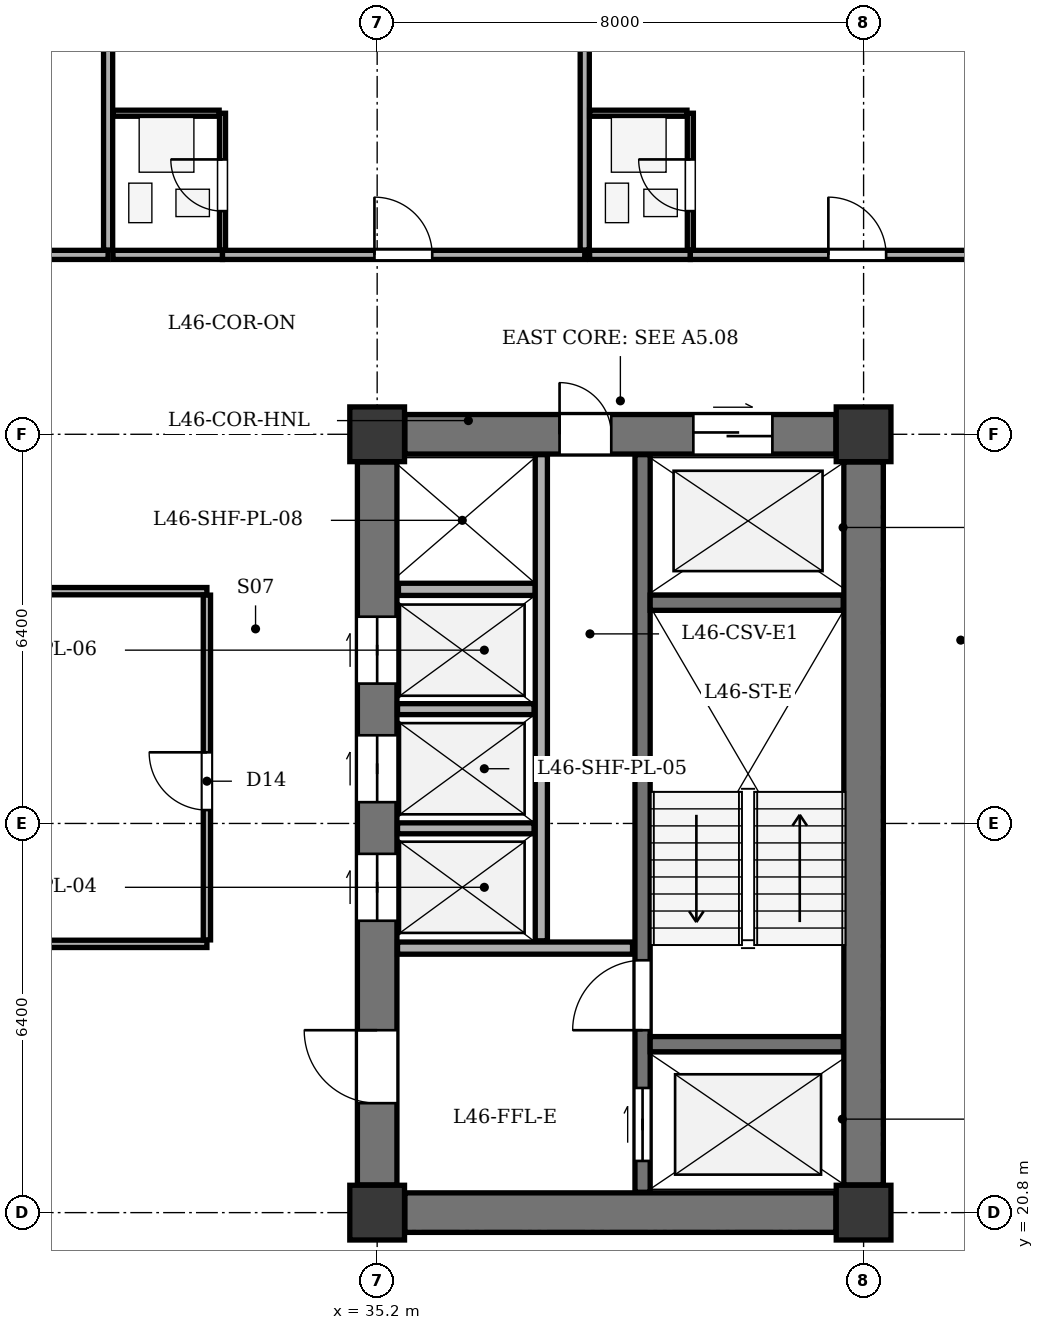
"""IFC4 building model, lengths in metres.
Left out: names, types, materials, properties, quantities, classifications, styles, units other than length and angle.
Written with IfcOpenShell. Run it as: python <this file> out.ifc"""

import sys

from ifc_helpers import new_model, si_unit, direction, frame, frame_2d, origin, origin_2d, place, context, subcontext, project, spatial, rectangle, extrude, element, fill, save


model = new_model("IFC4")
c1 = context("Model", 3, precision=1e-05, world=origin(), true_north=direction((0.0, 1.0)))
c2 = subcontext(c1, "Body", "Model", "MODEL_VIEW")
j1 = project(units=[si_unit("LENGTHUNIT", "METRE"), si_unit("PLANEANGLEUNIT", "RADIAN")], contexts=[c1])
p1 = place(None, origin())
s1 = spatial("IfcSite", under=j1, at=p1, CompositionType="ELEMENT")
p2 = place(p1, origin())
s2 = spatial("IfcBuilding", under=s1, at=p2, CompositionType="ELEMENT")
p3 = place(p2, frame((0.0, 0.0, 179.8)))
s3 = spatial("IfcBuildingStorey", under=s2, at=p3, CompositionType="ELEMENT", Elevation=179.8)
for number, where, z_axis, x_axis in (
    (1, (35.2, 20.8, 0.0), (0.0, 0.0, 1.0), (1.0, 0.0, 0.0)),
    (2, (43.2, 20.8, 0.0), (0.0, 0.0, 1.0), (1.0, 0.0, 0.0)),
    (3, (35.2, 33.6, 0.0), (0.0, 0.0, 1.0), (1.0, 0.0, 0.0)),
    (4, (43.2, 33.6, 0.0), (0.0, 0.0, 1.0), (1.0, 0.0, 0.0)),
):
    element("IfcColumn", number, at=place(p3, frame(where, z_axis=z_axis, x_axis=x_axis)), inside=s3, PredefinedType="COLUMN", context=c2, shape_type="SweptSolid", body=[
        extrude(rectangle(XDim=0.9, YDim=0.9, at=origin_2d()), origin(), (0.0, 0.0, 1.0), 3.5),
    ])
p4 = place(p3, frame((43.2, 21.255, 0.0), z_axis=(0.0, 0.0, 1.0), x_axis=(0.0, 1.0, 0.0)))
e5 = element("IfcWall", 5, at=p4, inside=s3, PredefinedType="SHEAR", context=c2, shape_type="SweptSolid", body=[
    extrude(rectangle(XDim=11.89, YDim=0.65, at=frame_2d((5.945, 0.0))), origin(), (0.0, 0.0, 1.0), 3.05),
])
p5 = place(p3, frame((35.655, 20.8, 0.0), z_axis=(0.0, 0.0, 1.0), x_axis=(1.0, 0.0, 0.0)))
e6 = element("IfcWall", 6, at=p5, inside=s3, PredefinedType="SHEAR", context=c2, shape_type="SweptSolid", body=[
    extrude(rectangle(XDim=7.09, YDim=0.65, at=frame_2d((3.545, 0.0))), origin(), (0.0, 0.0, 1.0), 3.05),
])
p6 = place(p3, frame((35.655, 33.6, 0.0), z_axis=(0.0, 0.0, 1.0), x_axis=(1.0, 0.0, 0.0)))
e7 = element("IfcWall", 7, at=p6, inside=s3, PredefinedType="SHEAR", context=c2, shape_type="SweptSolid", body=[
    extrude(rectangle(XDim=7.09, YDim=0.65, at=frame_2d((3.545, 0.0))), origin(), (0.0, 0.0, 1.0), 3.05),
])
p7 = place(p6, frame((4.745, 0.0, 0.0)))
e8 = element("IfcOpeningElement", 8, at=p7, cuts=e7, PredefinedType="OPENING", context=c2, shape_type="SweptSolid", body=[
    extrude(rectangle(XDim=1.3, YDim=2.15, at=frame_2d((0.65, 1.075))), frame((0.0, 0.335, 0.0), z_axis=(0.0, -1.0, 0.0), x_axis=(1.0, 0.0, 0.0)), (0.0, 0.0, 1.0), 0.67),
])
p8 = place(p6, frame((2.545, 0.0, 0.0)))
e9 = element("IfcOpeningElement", 9, at=p8, cuts=e7, PredefinedType="OPENING", context=c2, shape_type="SweptSolid", body=[
    extrude(rectangle(XDim=0.85, YDim=2.02, at=frame_2d((0.425, 1.01))), frame((0.0, 0.335, 0.0), z_axis=(0.0, -1.0, 0.0), x_axis=(1.0, 0.0, 0.0)), (0.0, 0.0, 1.0), 0.67),
])
p9 = place(p3, frame((35.2, 21.255, 0.0), z_axis=(0.0, 0.0, 1.0), x_axis=(0.0, 1.0, 0.0)))
e10 = element("IfcWall", 10, at=p9, inside=s3, PredefinedType="SHEAR", context=c2, shape_type="SweptSolid", body=[
    extrude(rectangle(XDim=11.89, YDim=0.65, at=frame_2d((5.945, 0.0))), origin(), (0.0, 0.0, 1.0), 3.05),
])
p10 = place(p9, frame((1.345, 0.0, 0.0)))
e11 = element("IfcOpeningElement", 11, at=p10, cuts=e10, PredefinedType="OPENING", context=c2, shape_type="SweptSolid", body=[
    extrude(rectangle(XDim=1.2, YDim=2.15, at=frame_2d((0.6, 1.075))), frame((0.0, 0.335, 0.0), z_axis=(0.0, -1.0, 0.0), x_axis=(1.0, 0.0, 0.0)), (0.0, 0.0, 1.0), 0.67),
])
p11 = place(p9, frame((4.345, 0.0, 0.0)))
e12 = element("IfcOpeningElement", 12, at=p11, cuts=e10, PredefinedType="OPENING", context=c2, shape_type="SweptSolid", body=[
    extrude(rectangle(XDim=1.1, YDim=2.1, at=frame_2d((0.55, 1.05))), frame((0.0, 0.335, 0.0), z_axis=(0.0, -1.0, 0.0), x_axis=(1.0, 0.0, 0.0)), (0.0, 0.0, 1.0), 0.67),
])
p12 = place(p9, frame((6.295, 0.0, 0.0)))
e13 = element("IfcOpeningElement", 13, at=p12, cuts=e10, PredefinedType="OPENING", context=c2, shape_type="SweptSolid", body=[
    extrude(rectangle(XDim=1.1, YDim=2.1, at=frame_2d((0.55, 1.05))), frame((0.0, 0.335, 0.0), z_axis=(0.0, -1.0, 0.0), x_axis=(1.0, 0.0, 0.0)), (0.0, 0.0, 1.0), 0.67),
])
p13 = place(p9, frame((8.245, 0.0, 0.0)))
e14 = element("IfcOpeningElement", 14, at=p13, cuts=e10, PredefinedType="OPENING", context=c2, shape_type="SweptSolid", body=[
    extrude(rectangle(XDim=1.1, YDim=2.1, at=frame_2d((0.55, 1.05))), frame((0.0, 0.335, 0.0), z_axis=(0.0, -1.0, 0.0), x_axis=(1.0, 0.0, 0.0)), (0.0, 0.0, 1.0), 0.67),
])
p14 = place(p3, frame((39.565, 21.135, 0.0), z_axis=(0.0, 0.0, 1.0), x_axis=(0.0, 1.0, 0.0)))
e15 = element("IfcWall", 15, at=p14, inside=s3, PredefinedType="SHEAR", context=c2, shape_type="SweptSolid", body=[
    extrude(rectangle(XDim=12.13, YDim=0.25, at=frame_2d((6.065, 0.0))), origin(), (0.0, 0.0, 1.0), 3.05),
])
p15 = place(p14, frame((0.515, 0.0, 0.0)))
e16 = element("IfcOpeningElement", 16, at=p15, cuts=e15, PredefinedType="OPENING", context=c2, shape_type="SweptSolid", body=[
    extrude(rectangle(XDim=1.2, YDim=2.15, at=frame_2d((0.6, 1.075))), frame((0.0, 0.135, 0.0), z_axis=(0.0, -1.0, 0.0), x_axis=(1.0, 0.0, 0.0)), (0.0, 0.0, 1.0), 0.27),
])
p16 = place(p14, frame((2.665, 0.0, 0.0)))
e17 = element("IfcOpeningElement", 17, at=p16, cuts=e15, PredefinedType="OPENING", context=c2, shape_type="SweptSolid", body=[
    extrude(rectangle(XDim=1.15, YDim=2.15, at=frame_2d((0.575, 1.075))), frame((0.0, 0.135, 0.0), z_axis=(0.0, -1.0, 0.0), x_axis=(1.0, 0.0, 0.0)), (0.0, 0.0, 1.0), 0.27),
])
for number, where, z_axis, x_axis in (
    (18, (39.69, 23.57, 0.0), (0.0, 0.0, 1.0), (1.0, 0.0, 0.0)),
    (19, (39.69, 30.83, 0.0), (0.0, 0.0, 1.0), (1.0, 0.0, 0.0)),
):
    element("IfcWall", number, at=place(p3, frame(where, z_axis=z_axis, x_axis=x_axis)), inside=s3, PredefinedType="SHEAR", context=c2, shape_type="SweptSolid", body=[
        extrude(rectangle(XDim=3.175, YDim=0.25, at=frame_2d((1.587, 0.0))), origin(), (0.0, 0.0, 1.0), 3.05),
    ])
p17 = place(p3, frame((35.535, 25.15, 0.0), z_axis=(0.0, 0.0, 1.0), x_axis=(1.0, 0.0, 0.0)))
e20 = element("IfcWall", 20, at=p17, inside=s3, PredefinedType="SOLIDWALL", context=c2, shape_type="SweptSolid", body=[
    extrude(rectangle(XDim=3.865, YDim=0.2, at=frame_2d((1.933, 0.0))), origin(), (0.0, 0.0, 1.0), 3.05),
])
p18 = place(p3, frame((35.55, 31.05, 0.0), z_axis=(0.0, 0.0, 1.0), x_axis=(1.0, 0.0, 0.0)))
e21 = element("IfcWall", 21, at=p18, inside=s3, PredefinedType="SOLIDWALL", context=c2, shape_type="SweptSolid", body=[
    extrude(rectangle(XDim=2.25, YDim=0.2, at=frame_2d((1.125, 0.0))), origin(), (0.0, 0.0, 1.0), 3.05),
])
p19 = place(p3, frame((37.9, 25.27, 0.0), z_axis=(0.0, 0.0, 1.0), x_axis=(0.0, 1.0, 0.0)))
e22 = element("IfcWall", 22, at=p19, inside=s3, PredefinedType="SOLIDWALL", context=c2, shape_type="SweptSolid", body=[
    extrude(rectangle(XDim=7.995, YDim=0.2, at=frame_2d((3.998, 0.0))), origin(), (0.0, 0.0, 1.0), 3.05),
])
for number, where, z_axis, x_axis in (
    (23, (35.535, 27.12, 0.0), (0.0, 0.0, 1.0), (1.0, 0.0, 0.0)),
    (24, (35.535, 29.08, 0.0), (0.0, 0.0, 1.0), (1.0, 0.0, 0.0)),
):
    element("IfcWall", number, at=place(p3, frame(where, z_axis=z_axis, x_axis=x_axis)), inside=s3, PredefinedType="PARTITIONING", context=c2, shape_type="SweptSolid", body=[
        extrude(rectangle(XDim=2.245, YDim=0.18, at=frame_2d((1.123, 0.0))), origin(), (0.0, 0.0, 1.0), 3.05),
    ])
p20 = place(p3, frame((20.46, 25.22, 0.0), z_axis=(0.0, 0.0, 1.0), x_axis=(1.0, 0.0, 0.0)))
e25 = element("IfcWall", 25, at=p20, inside=s3, PredefinedType="PARTITIONING", context=c2, shape_type="SweptSolid", body=[
    extrude(rectangle(XDim=11.94, YDim=0.12, at=frame_2d((5.97, 0.0))), origin(), (0.0, 0.0, 1.0), 3.05),
])
p21 = place(p20, frame((0.68, 0.0, 0.0)))
e26 = element("IfcOpeningElement", 26, at=p21, cuts=e25, PredefinedType="OPENING", context=c2, shape_type="SweptSolid", body=[
    extrude(rectangle(XDim=1.0, YDim=2.1, at=frame_2d((0.5, 1.05))), frame((0.0, 0.07, 0.0), z_axis=(0.0, -1.0, 0.0), x_axis=(1.0, 0.0, 0.0)), (0.0, 0.0, 1.0), 0.14),
])
p22 = place(p3, frame((20.46, 31.02, 0.0), z_axis=(0.0, 0.0, 1.0), x_axis=(1.0, 0.0, 0.0)))
e27 = element("IfcWall", 27, at=p22, inside=s3, PredefinedType="PARTITIONING", context=c2, shape_type="SweptSolid", body=[
    extrude(rectangle(XDim=11.94, YDim=0.12, at=frame_2d((5.97, 0.0))), origin(), (0.0, 0.0, 1.0), 3.05),
])
p23 = place(p3, frame((32.4, 25.285, 0.0), z_axis=(0.0, 0.0, 1.0), x_axis=(0.0, 1.0, 0.0)))
e28 = element("IfcWall", 28, at=p23, inside=s3, PredefinedType="PARTITIONING", context=c2, shape_type="SweptSolid", body=[
    extrude(rectangle(XDim=5.67, YDim=0.12, at=frame_2d((2.835, 0.0))), origin(), (0.0, 0.0, 1.0), 3.05),
])
p24 = place(p23, frame((2.135, 0.0, 0.0)))
e29 = element("IfcOpeningElement", 29, at=p24, cuts=e28, PredefinedType="OPENING", context=c2, shape_type="SweptSolid", body=[
    extrude(rectangle(XDim=0.95, YDim=2.1, at=frame_2d((0.475, 1.05))), frame((0.0, 0.07, 0.0), z_axis=(0.0, -1.0, 0.0), x_axis=(1.0, 0.0, 0.0)), (0.0, 0.0, 1.0), 0.14),
])
p25 = place(p3, frame((24.817, 36.55, 0.0), z_axis=(0.0, 0.0, 1.0), x_axis=(1.0, 0.0, 0.0)))
e30 = element("IfcWall", 30, at=p25, inside=s3, PredefinedType="PARTITIONING", context=c2, shape_type="SweptSolid", body=[
    extrude(rectangle(XDim=5.958, YDim=0.15, at=frame_2d((2.979, 0.0))), origin(), (0.0, 0.0, 1.0), 3.05),
])
p26 = place(p25, frame((2.499, 0.0, 0.0)))
e31 = element("IfcOpeningElement", 31, at=p26, cuts=e30, PredefinedType="OPENING", context=c2, shape_type="SweptSolid", body=[
    extrude(rectangle(XDim=0.95, YDim=2.1, at=frame_2d((0.475, 1.05))), frame((0.0, 0.085, 0.0), z_axis=(0.0, -1.0, 0.0), x_axis=(1.0, 0.0, 0.0)), (0.0, 0.0, 1.0), 0.17),
])
p27 = place(p3, frame((30.775, 36.63, 0.0), z_axis=(0.0, 0.0, 1.0), x_axis=(0.0, 1.0, 0.0)))
e32 = element("IfcWall", 32, at=p27, inside=s3, PredefinedType="PARTITIONING", context=c2, shape_type="SweptSolid", body=[
    extrude(rectangle(XDim=15.895, YDim=0.15, at=frame_2d((7.948, 0.0))), origin(), (0.0, 0.0, 1.0), 3.05),
])
p28 = place(p3, frame((30.855, 36.55, 0.0), z_axis=(0.0, 0.0, 1.0), x_axis=(1.0, 0.0, 0.0)))
e33 = element("IfcWall", 33, at=p28, inside=s3, PredefinedType="PARTITIONING", context=c2, shape_type="SweptSolid", body=[
    extrude(rectangle(XDim=1.802, YDim=0.15, at=frame_2d((0.901, 0.0))), origin(), (0.0, 0.0, 1.0), 3.05),
])
p29 = place(p3, frame((32.656, 36.55, 0.0), z_axis=(0.0, 0.0, 1.0), x_axis=(1.0, 0.0, 0.0)))
e34 = element("IfcWall", 34, at=p29, inside=s3, PredefinedType="PARTITIONING", context=c2, shape_type="SweptSolid", body=[
    extrude(rectangle(XDim=5.958, YDim=0.15, at=frame_2d((2.979, 0.0))), origin(), (0.0, 0.0, 1.0), 3.05),
])
p30 = place(p29, frame((2.499, 0.0, 0.0)))
e35 = element("IfcOpeningElement", 35, at=p30, cuts=e34, PredefinedType="OPENING", context=c2, shape_type="SweptSolid", body=[
    extrude(rectangle(XDim=0.95, YDim=2.1, at=frame_2d((0.475, 1.05))), frame((0.0, 0.085, 0.0), z_axis=(0.0, -1.0, 0.0), x_axis=(1.0, 0.0, 0.0)), (0.0, 0.0, 1.0), 0.17),
])
p31 = place(p3, frame((32.656, 36.63, 0.0), z_axis=(0.0, 0.0, 1.0), x_axis=(0.0, 1.0, 0.0)))
e36 = element("IfcWall", 36, at=p31, inside=s3, PredefinedType="PARTITIONING", context=c2, shape_type="SweptSolid", body=[
    extrude(rectangle(XDim=2.25, YDim=0.1, at=frame_2d((1.125, 0.0))), origin(), (0.0, 0.0, 1.0), 3.05),
])
p32 = place(p31, frame((0.64, 0.0, 0.0)))
e37 = element("IfcOpeningElement", 37, at=p32, cuts=e36, PredefinedType="OPENING", context=c2, shape_type="SweptSolid", body=[
    extrude(rectangle(XDim=0.85, YDim=2.05, at=frame_2d((0.425, 1.025))), frame((0.0, 0.06, 0.0), z_axis=(0.0, -1.0, 0.0), x_axis=(1.0, 0.0, 0.0)), (0.0, 0.0, 1.0), 0.12),
])
p33 = place(p3, frame((30.855, 38.88, 0.0), z_axis=(0.0, 0.0, 1.0), x_axis=(1.0, 0.0, 0.0)))
e38 = element("IfcWall", 38, at=p33, inside=s3, PredefinedType="PARTITIONING", context=c2, shape_type="SweptSolid", body=[
    extrude(rectangle(XDim=1.746, YDim=0.1, at=frame_2d((0.873, 0.0))), origin(), (0.0, 0.0, 1.0), 3.05),
])
p34 = place(p3, frame((38.614, 36.63, 0.0), z_axis=(0.0, 0.0, 1.0), x_axis=(0.0, 1.0, 0.0)))
e39 = element("IfcWall", 39, at=p34, inside=s3, PredefinedType="PARTITIONING", context=c2, shape_type="SweptSolid", body=[
    extrude(rectangle(XDim=15.895, YDim=0.15, at=frame_2d((7.948, 0.0))), origin(), (0.0, 0.0, 1.0), 2.485),
])
p35 = place(p3, frame((38.694, 36.55, 0.0), z_axis=(0.0, 0.0, 1.0), x_axis=(1.0, 0.0, 0.0)))
e40 = element("IfcWall", 40, at=p35, inside=s3, PredefinedType="PARTITIONING", context=c2, shape_type="SweptSolid", body=[
    extrude(rectangle(XDim=1.656, YDim=0.15, at=frame_2d((0.828, 0.0))), origin(), (0.0, 0.0, 1.0), 3.05),
])
p36 = place(p3, frame((40.351, 36.55, 0.0), z_axis=(0.0, 0.0, 1.0), x_axis=(1.0, 0.0, 0.0)))
e41 = element("IfcWall", 41, at=p36, inside=s3, PredefinedType="PARTITIONING", context=c2, shape_type="SweptSolid", body=[
    extrude(rectangle(XDim=5.5, YDim=0.15, at=frame_2d((2.75, 0.0))), origin(), (0.0, 0.0, 1.0), 3.05),
])
p37 = place(p36, frame((2.27, 0.0, 0.0)))
e42 = element("IfcOpeningElement", 42, at=p37, cuts=e41, PredefinedType="OPENING", context=c2, shape_type="SweptSolid", body=[
    extrude(rectangle(XDim=0.95, YDim=2.1, at=frame_2d((0.475, 1.05))), frame((0.0, 0.085, 0.0), z_axis=(0.0, -1.0, 0.0), x_axis=(1.0, 0.0, 0.0)), (0.0, 0.0, 1.0), 0.17),
])
p38 = place(p3, frame((40.351, 36.63, 0.0), z_axis=(0.0, 0.0, 1.0), x_axis=(0.0, 1.0, 0.0)))
e43 = element("IfcWall", 43, at=p38, inside=s3, PredefinedType="PARTITIONING", context=c2, shape_type="SweptSolid", body=[
    extrude(rectangle(XDim=2.25, YDim=0.1, at=frame_2d((1.125, 0.0))), origin(), (0.0, 0.0, 1.0), 2.485),
])
p39 = place(p38, frame((0.64, 0.0, 0.0)))
e44 = element("IfcOpeningElement", 44, at=p39, cuts=e43, PredefinedType="OPENING", context=c2, shape_type="SweptSolid", body=[
    extrude(rectangle(XDim=0.85, YDim=2.05, at=frame_2d((0.425, 1.025))), frame((0.0, 0.06, 0.0), z_axis=(0.0, -1.0, 0.0), x_axis=(1.0, 0.0, 0.0)), (0.0, 0.0, 1.0), 0.12),
])
p40 = place(p3, frame((38.694, 38.88, 0.0), z_axis=(0.0, 0.0, 1.0), x_axis=(1.0, 0.0, 0.0)))
e45 = element("IfcWall", 45, at=p40, inside=s3, PredefinedType="PARTITIONING", context=c2, shape_type="SweptSolid", body=[
    extrude(rectangle(XDim=1.602, YDim=0.1, at=frame_2d((0.801, 0.0))), origin(), (0.0, 0.0, 1.0), 3.05),
])
p41 = place(p7, origin())
e46 = element("IfcDoor", 46, at=p41, inside=s3, OperationType="DOUBLE_DOOR_SLIDING", PredefinedType="DOOR", context=c2, shape_type="SweptSolid", body=[
    extrude(rectangle(XDim=1.3, YDim=2.15, at=frame_2d((0.65, 1.075))), frame((0.0, 0.025, 0.0), z_axis=(0.0, -1.0, 0.0), x_axis=(1.0, 0.0, 0.0)), (0.0, 0.0, 1.0), 0.05),
])
fill(e8, e46)
p42 = place(p8, origin())
e47 = element("IfcDoor", 47, at=p42, inside=s3, OperationType="SINGLE_SWING_LEFT", PredefinedType="DOOR", context=c2, shape_type="SweptSolid", body=[
    extrude(rectangle(XDim=0.85, YDim=2.02, at=frame_2d((0.425, 1.01))), frame((0.0, 0.025, 0.0), z_axis=(0.0, -1.0, 0.0), x_axis=(1.0, 0.0, 0.0)), (0.0, 0.0, 1.0), 0.05),
])
fill(e9, e47)
p43 = place(p10, origin())
e48 = element("IfcDoor", 48, at=p43, inside=s3, OperationType="SINGLE_SWING_RIGHT", PredefinedType="DOOR", context=c2, shape_type="SweptSolid", body=[
    extrude(rectangle(XDim=1.2, YDim=2.15, at=frame_2d((0.6, 1.075))), frame((0.0, 0.025, 0.0), z_axis=(0.0, -1.0, 0.0), x_axis=(1.0, 0.0, 0.0)), (0.0, 0.0, 1.0), 0.05),
])
fill(e11, e48)
p44 = place(p11, origin())
e49 = element("IfcDoor", 49, at=p44, inside=s3, OperationType="DOUBLE_DOOR_SLIDING", PredefinedType="DOOR", context=c2, shape_type="SweptSolid", body=[
    extrude(rectangle(XDim=1.1, YDim=2.1, at=frame_2d((0.55, 1.05))), frame((0.0, 0.025, 0.0), z_axis=(0.0, -1.0, 0.0), x_axis=(1.0, 0.0, 0.0)), (0.0, 0.0, 1.0), 0.05),
])
fill(e12, e49)
p45 = place(p12, origin())
e50 = element("IfcDoor", 50, at=p45, inside=s3, OperationType="DOUBLE_DOOR_SLIDING", PredefinedType="DOOR", context=c2, shape_type="SweptSolid", body=[
    extrude(rectangle(XDim=1.1, YDim=2.1, at=frame_2d((0.55, 1.05))), frame((0.0, 0.025, 0.0), z_axis=(0.0, -1.0, 0.0), x_axis=(1.0, 0.0, 0.0)), (0.0, 0.0, 1.0), 0.05),
])
fill(e13, e50)
p46 = place(p13, origin())
e51 = element("IfcDoor", 51, at=p46, inside=s3, OperationType="DOUBLE_DOOR_SLIDING", PredefinedType="DOOR", context=c2, shape_type="SweptSolid", body=[
    extrude(rectangle(XDim=1.1, YDim=2.1, at=frame_2d((0.55, 1.05))), frame((0.0, 0.025, 0.0), z_axis=(0.0, -1.0, 0.0), x_axis=(1.0, 0.0, 0.0)), (0.0, 0.0, 1.0), 0.05),
])
fill(e14, e51)
p47 = place(p15, origin())
e52 = element("IfcDoor", 52, at=p47, inside=s3, OperationType="DOUBLE_DOOR_SLIDING", PredefinedType="DOOR", context=c2, shape_type="SweptSolid", body=[
    extrude(rectangle(XDim=1.2, YDim=2.15, at=frame_2d((0.6, 1.075))), frame((0.0, 0.025, 0.0), z_axis=(0.0, -1.0, 0.0), x_axis=(1.0, 0.0, 0.0)), (0.0, 0.0, 1.0), 0.05),
])
fill(e16, e52)
p48 = place(p16, origin())
e53 = element("IfcDoor", 53, at=p48, inside=s3, OperationType="SINGLE_SWING_LEFT", PredefinedType="DOOR", context=c2, shape_type="SweptSolid", body=[
    extrude(rectangle(XDim=1.15, YDim=2.15, at=frame_2d((0.575, 1.075))), frame((0.0, 0.025, 0.0), z_axis=(0.0, -1.0, 0.0), x_axis=(1.0, 0.0, 0.0)), (0.0, 0.0, 1.0), 0.05),
])
fill(e17, e53)
p49 = place(p24, origin())
e54 = element("IfcDoor", 54, at=p49, inside=s3, OperationType="SINGLE_SWING_RIGHT", PredefinedType="DOOR", context=c2, shape_type="SweptSolid", body=[
    extrude(rectangle(XDim=0.95, YDim=2.1, at=frame_2d((0.475, 1.05))), frame((0.0, 0.025, 0.0), z_axis=(0.0, -1.0, 0.0), x_axis=(1.0, 0.0, 0.0)), (0.0, 0.0, 1.0), 0.05),
])
fill(e29, e54)
p50 = place(p32, origin())
e55 = element("IfcDoor", 55, at=p50, inside=s3, OperationType="SINGLE_SWING_RIGHT", PredefinedType="DOOR", context=c2, shape_type="SweptSolid", body=[
    extrude(rectangle(XDim=0.85, YDim=2.05, at=frame_2d((0.425, 1.025))), frame((0.0, 0.025, 0.0), z_axis=(0.0, -1.0, 0.0), x_axis=(1.0, 0.0, 0.0)), (0.0, 0.0, 1.0), 0.05),
])
fill(e37, e55)
p51 = place(p30, origin())
e56 = element("IfcDoor", 56, at=p51, inside=s3, OperationType="SINGLE_SWING_LEFT", PredefinedType="DOOR", context=c2, shape_type="SweptSolid", body=[
    extrude(rectangle(XDim=0.95, YDim=2.1, at=frame_2d((0.475, 1.05))), frame((0.0, 0.025, 0.0), z_axis=(0.0, -1.0, 0.0), x_axis=(1.0, 0.0, 0.0)), (0.0, 0.0, 1.0), 0.05),
])
fill(e35, e56)
p52 = place(p39, origin())
e57 = element("IfcDoor", 57, at=p52, inside=s3, OperationType="SINGLE_SWING_RIGHT", PredefinedType="DOOR", context=c2, shape_type="SweptSolid", body=[
    extrude(rectangle(XDim=0.85, YDim=2.05, at=frame_2d((0.425, 1.025))), frame((0.0, 0.025, 0.0), z_axis=(0.0, -1.0, 0.0), x_axis=(1.0, 0.0, 0.0)), (0.0, 0.0, 1.0), 0.05),
])
fill(e44, e57)
p53 = place(p37, origin())
e58 = element("IfcDoor", 58, at=p53, inside=s3, OperationType="SINGLE_SWING_LEFT", PredefinedType="DOOR", context=c2, shape_type="SweptSolid", body=[
    extrude(rectangle(XDim=0.95, YDim=2.1, at=frame_2d((0.475, 1.05))), frame((0.0, 0.025, 0.0), z_axis=(0.0, -1.0, 0.0), x_axis=(1.0, 0.0, 0.0)), (0.0, 0.0, 1.0), 0.05),
])
fill(e42, e58)
save(model, sys.argv[1])
